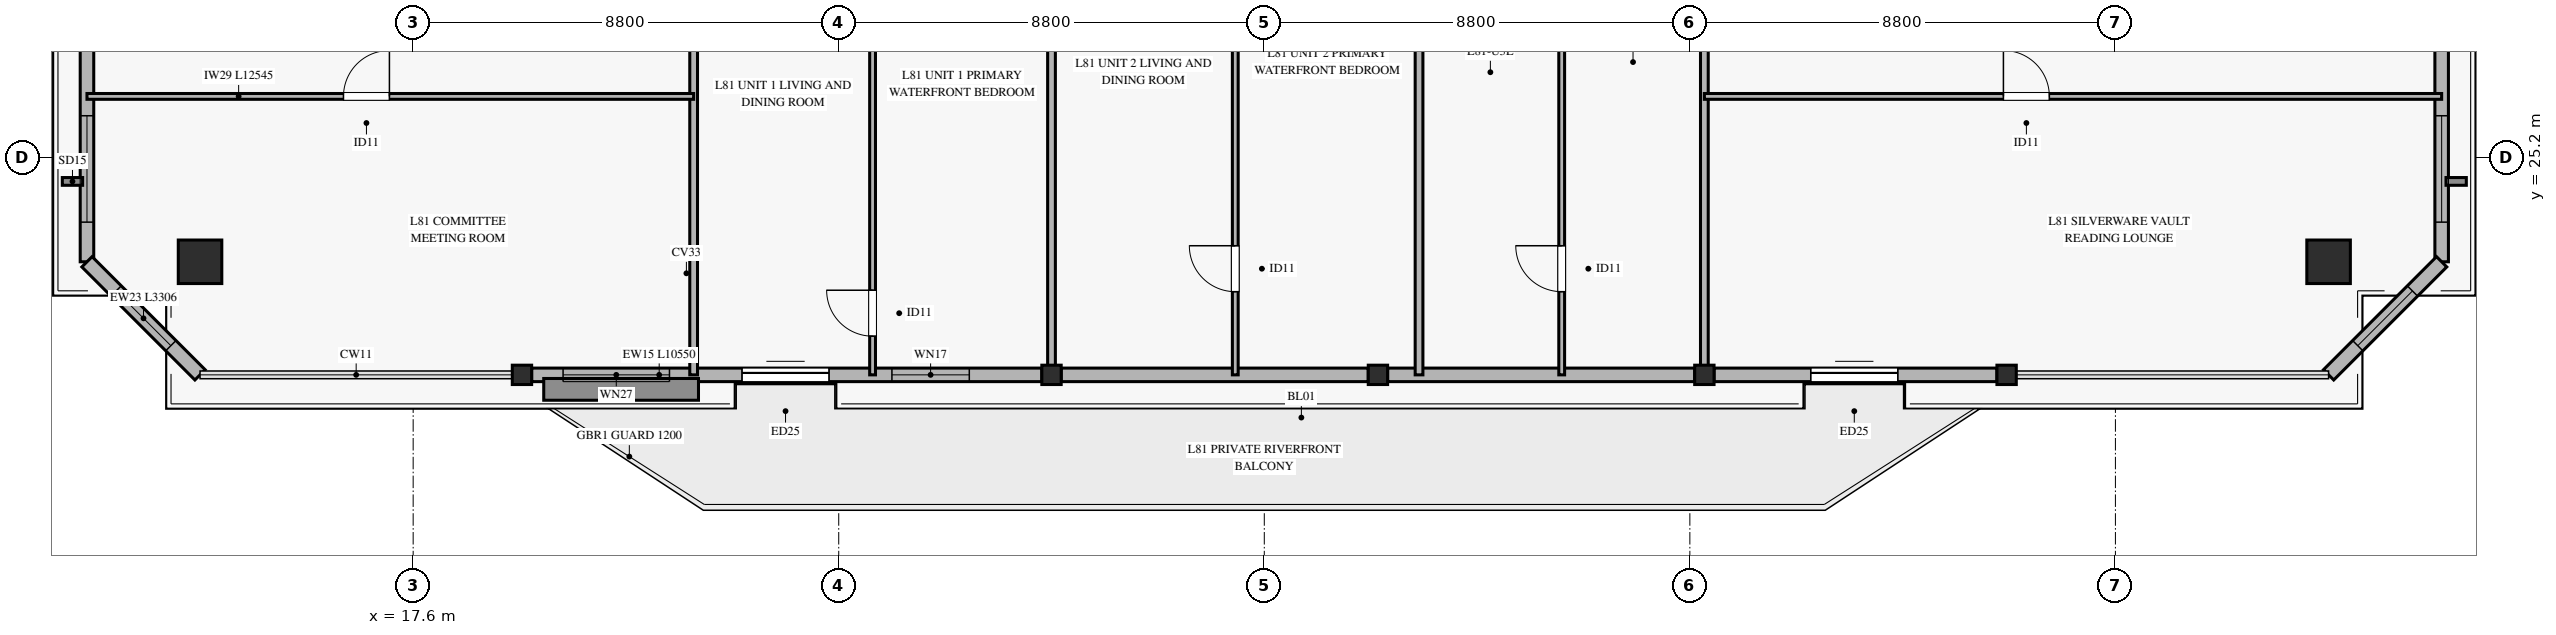
"""IFC4 building model, lengths in metres.
Left out: names, types, materials, properties, quantities, classifications, styles, units other than length and angle.
Written with IfcOpenShell. Run it as: python <this file> out.ifc"""

import sys

from ifc_helpers import new_model, si_unit, direction, frame, frame_2d, origin, origin_2d, place, context, subcontext, project, spatial, rectangle, hollow_rectangle, extrude, source, transform, mapped, element, fill, save


model = new_model("IFC4")
c1 = context("Model", 3, precision=1e-05, world=origin(), true_north=direction((0.0, 1.0)))
c2 = subcontext(c1, "Body", "Model", "MODEL_VIEW")
j1 = project(units=[si_unit("LENGTHUNIT", "METRE"), si_unit("PLANEANGLEUNIT", "RADIAN")], contexts=[c1])
p1 = place(None, origin())
s1 = spatial("IfcSite", under=j1, at=p1, CompositionType="ELEMENT")
p2 = place(p1, origin())
s2 = spatial("IfcBuilding", under=s1, at=p2, CompositionType="ELEMENT")
p3 = place(p2, frame((0.0, 0.0, 314.2)))
s3 = spatial("IfcBuildingStorey", under=s2, at=p3, CompositionType="ELEMENT", Elevation=314.2)
m1 = source(origin(), c2, "Body", "SweptSolid", [
    extrude(hollow_rectangle(XDim=0.9, YDim=0.9, WallThickness=0.04, at=origin_2d()), origin(), (0.0, 0.0, 1.0), 3.185),
])
for number, where, z_axis, x_axis in (
    (1, (13.193, 23.042, 0.0), (0.0, 0.0, 1.0), (1.0, 0.0, 0.0)),
    (2, (57.208, 23.042, 0.0), (0.0, 0.0, 1.0), (1.0, 0.0, 0.0)),
):
    element("IfcColumn", number, at=place(p3, frame(where, z_axis=z_axis, x_axis=x_axis)), inside=s3, PredefinedType="COLUMN", context=c2, shape_type="MappedRepresentation", body=[
        mapped(m1, transform((0.0, 0.0, 0.0), x_axis=(1.0, 0.0, 0.0), y_axis=(0.0, 1.0, 0.0), z_axis=(0.0, 0.0, 1.0), scale=1.0)),
    ])
m2 = source(origin(), c2, "Body", "SweptSolid", [
    extrude(hollow_rectangle(XDim=0.4, YDim=0.4, WallThickness=0.02, at=origin_2d()), origin(), (0.0, 0.0, 1.0), 3.185),
])
for number, where, z_axis, x_axis in (
    (3, (19.85, 20.704, 0.0), (0.0, 0.0, 1.0), (1.0, 0.0, 0.0)),
    (4, (30.8, 20.704, 0.0), (0.0, 0.0, 1.0), (1.0, 0.0, 0.0)),
    (5, (37.55, 20.704, 0.0), (0.0, 0.0, 1.0), (1.0, 0.0, 0.0)),
    (6, (44.3, 20.704, 0.0), (0.0, 0.0, 1.0), (1.0, 0.0, 0.0)),
    (7, (50.55, 20.704, 0.0), (0.0, 0.0, 1.0), (1.0, 0.0, 0.0)),
):
    element("IfcColumn", number, at=place(p3, frame(where, z_axis=z_axis, x_axis=x_axis)), inside=s3, PredefinedType="COLUMN", context=c2, shape_type="MappedRepresentation", body=[
        mapped(m2, transform((0.0, 0.0, 0.0), x_axis=(1.0, 0.0, 0.0), y_axis=(0.0, 1.0, 0.0), z_axis=(0.0, 0.0, 1.0), scale=1.0)),
    ])
p4 = place(p3, frame((20.05, 20.704, 0.0), z_axis=(0.0, 0.0, 1.0), x_axis=(1.0, 0.0, 0.0)))
e8 = element("IfcWall", 8, at=p4, inside=s3, PredefinedType="SOLIDWALL", context=c2, shape_type="SweptSolid", body=[
    extrude(rectangle(XDim=10.55, YDim=0.28, at=frame_2d((5.275, 0.0))), origin(), (0.0, 0.0, 1.0), 2.815),
])
p5 = place(p4, frame((4.35, 0.0, 0.0)))
e9 = element("IfcOpeningElement", 9, at=p5, cuts=e8, PredefinedType="OPENING", context=c2, shape_type="SweptSolid", body=[
    extrude(rectangle(XDim=1.8, YDim=2.25, at=frame_2d((0.9, 1.125))), frame((0.0, 0.15, 0.0), z_axis=(0.0, -1.0, 0.0), x_axis=(1.0, 0.0, 0.0)), (0.0, 0.0, 1.0), 0.3),
])
p6 = place(p4, frame((0.65, 0.0, 0.45)))
e10 = element("IfcOpeningElement", 10, at=p6, cuts=e8, PredefinedType="OPENING", context=c2, shape_type="SweptSolid", body=[
    extrude(rectangle(XDim=2.2, YDim=2.1, at=frame_2d((1.1, 1.05))), frame((0.0, 0.15, 0.0), z_axis=(0.0, -1.0, 0.0), x_axis=(1.0, 0.0, 0.0)), (0.0, 0.0, 1.0), 0.3),
])
p7 = place(p4, frame((7.45, 0.0, 0.45)))
e11 = element("IfcOpeningElement", 11, at=p7, cuts=e8, PredefinedType="OPENING", context=c2, shape_type="SweptSolid", body=[
    extrude(rectangle(XDim=1.6, YDim=2.0, at=frame_2d((0.8, 1.0))), frame((0.0, 0.15, 0.0), z_axis=(0.0, -1.0, 0.0), x_axis=(1.0, 0.0, 0.0)), (0.0, 0.0, 1.0), 0.3),
])
for number, where, z_axis, x_axis in (
    (12, (31.0, 20.704, 0.0), (0.0, 0.0, 1.0), (1.0, 0.0, 0.0)),
    (13, (37.75, 20.704, 0.0), (0.0, 0.0, 1.0), (1.0, 0.0, 0.0)),
):
    element("IfcWall", number, at=place(p3, frame(where, z_axis=z_axis, x_axis=x_axis)), inside=s3, PredefinedType="SOLIDWALL", context=c2, shape_type="SweptSolid", body=[
        extrude(rectangle(XDim=6.35, YDim=0.28, at=frame_2d((3.175, 0.0))), origin(), (0.0, 0.0, 1.0), 2.815),
    ])
p8 = place(p3, frame((44.5, 20.704, 0.0), z_axis=(0.0, 0.0, 1.0), x_axis=(1.0, 0.0, 0.0)))
e14 = element("IfcWall", 14, at=p8, inside=s3, PredefinedType="SOLIDWALL", context=c2, shape_type="SweptSolid", body=[
    extrude(rectangle(XDim=5.85, YDim=0.28, at=frame_2d((2.925, 0.0))), origin(), (0.0, 0.0, 1.0), 2.815),
])
p9 = place(p8, frame((2.0, 0.0, 0.0)))
e15 = element("IfcOpeningElement", 15, at=p9, cuts=e14, PredefinedType="OPENING", context=c2, shape_type="SweptSolid", body=[
    extrude(rectangle(XDim=1.8, YDim=2.25, at=frame_2d((0.9, 1.125))), frame((0.0, 0.15, 0.0), z_axis=(0.0, -1.0, 0.0), x_axis=(1.0, 0.0, 0.0)), (0.0, 0.0, 1.0), 0.3),
])
p10 = place(p3, frame((10.855, 23.042, 0.0), z_axis=(0.0, 0.0, 1.0), x_axis=(0.0, 1.0, 0.0)))
e16 = element("IfcWall", 16, at=p10, inside=s3, PredefinedType="SOLIDWALL", context=c2, shape_type="SweptSolid", body=[
    extrude(rectangle(XDim=10.16, YDim=0.28, at=frame_2d((5.08, 0.0))), origin(), (0.0, 0.0, 1.0), 2.815),
])
p11 = place(p10, frame((0.82, 0.0, 0.45)))
e17 = element("IfcOpeningElement", 17, at=p11, cuts=e16, PredefinedType="OPENING", context=c2, shape_type="SweptSolid", body=[
    extrude(rectangle(XDim=2.2, YDim=2.1, at=frame_2d((1.1, 1.05))), frame((0.0, 0.15, 0.0), z_axis=(0.0, -1.0, 0.0), x_axis=(1.0, 0.0, 0.0)), (0.0, 0.0, 1.0), 0.3),
])
p12 = place(p10, frame((6.362, 0.0, 0.45)))
e18 = element("IfcOpeningElement", 18, at=p12, cuts=e16, PredefinedType="OPENING", context=c2, shape_type="SweptSolid", body=[
    extrude(rectangle(XDim=2.2, YDim=2.1, at=frame_2d((1.1, 1.05))), frame((0.0, 0.15, 0.0), z_axis=(0.0, -1.0, 0.0), x_axis=(1.0, 0.0, 0.0)), (0.0, 0.0, 1.0), 0.3),
])
p13 = place(p3, frame((59.546, 23.042, 0.0), z_axis=(0.0, 0.0, 1.0), x_axis=(0.0, 1.0, 0.0)))
e19 = element("IfcWall", 19, at=p13, inside=s3, PredefinedType="SOLIDWALL", context=c2, shape_type="SweptSolid", body=[
    extrude(rectangle(XDim=10.16, YDim=0.28, at=frame_2d((5.08, 0.0))), origin(), (0.0, 0.0, 1.0), 2.815),
])
p14 = place(p13, frame((0.82, 0.0, 0.45)))
e20 = element("IfcOpeningElement", 20, at=p14, cuts=e19, PredefinedType="OPENING", context=c2, shape_type="SweptSolid", body=[
    extrude(rectangle(XDim=2.2, YDim=2.1, at=frame_2d((1.1, 1.05))), frame((0.0, 0.15, 0.0), z_axis=(0.0, -1.0, 0.0), x_axis=(1.0, 0.0, 0.0)), (0.0, 0.0, 1.0), 0.3),
])
p15 = place(p13, frame((6.362, 0.0, 0.45)))
e21 = element("IfcOpeningElement", 21, at=p15, cuts=e19, PredefinedType="OPENING", context=c2, shape_type="SweptSolid", body=[
    extrude(rectangle(XDim=2.2, YDim=2.1, at=frame_2d((1.1, 1.05))), frame((0.0, 0.15, 0.0), z_axis=(0.0, -1.0, 0.0), x_axis=(1.0, 0.0, 0.0)), (0.0, 0.0, 1.0), 0.3),
])
p16 = place(p3, frame((10.855, 23.042, 0.0), z_axis=(0.0, 0.0, 1.0), x_axis=(0.707143699075, -0.70706986137, 0.0)))
e22 = element("IfcWall", 22, at=p16, inside=s3, PredefinedType="SOLIDWALL", context=c2, shape_type="SweptSolid", body=[
    extrude(rectangle(XDim=3.306, YDim=0.3, at=frame_2d((1.653, 0.0))), origin(), (0.0, 0.0, 1.0), 2.815),
])
p17 = place(p16, frame((0.853, 0.0, 0.45)))
e23 = element("IfcOpeningElement", 23, at=p17, cuts=e22, PredefinedType="OPENING", context=c2, shape_type="SweptSolid", body=[
    extrude(rectangle(XDim=1.6, YDim=2.0, at=frame_2d((0.8, 1.0))), frame((0.0, 0.16, 0.0), z_axis=(0.0, -1.0, 0.0), x_axis=(1.0, 0.0, 0.0)), (0.0, 0.0, 1.0), 0.32),
])
p18 = place(p3, frame((57.208, 20.704, 0.0), z_axis=(0.0, 0.0, 1.0), x_axis=(0.707106781187, 0.707106781187, 0.0)))
e24 = element("IfcWall", 24, at=p18, inside=s3, PredefinedType="SOLIDWALL", context=c2, shape_type="SweptSolid", body=[
    extrude(rectangle(XDim=3.306, YDim=0.3, at=frame_2d((1.653, 0.0))), origin(), (0.0, 0.0, 1.0), 2.815),
])
p19 = place(p18, frame((0.853, 0.0, 0.45)))
e25 = element("IfcOpeningElement", 25, at=p19, cuts=e24, PredefinedType="OPENING", context=c2, shape_type="SweptSolid", body=[
    extrude(rectangle(XDim=1.6, YDim=2.0, at=frame_2d((0.8, 1.0))), frame((0.0, 0.16, 0.0), z_axis=(0.0, -1.0, 0.0), x_axis=(1.0, 0.0, 0.0)), (0.0, 0.0, 1.0), 0.32),
])
p20 = place(p3, frame((23.4, 20.704, 0.0), z_axis=(0.0, 0.0, 1.0), x_axis=(0.0, 1.0, 0.0)))
e26 = element("IfcWall", 26, at=p20, inside=s3, PredefinedType="PARTITIONING", context=c2, shape_type="SweptSolid", body=[
    extrude(rectangle(XDim=16.746, YDim=0.16, at=frame_2d((8.373, 0.0))), origin(), (0.0, 0.0, 1.0), 2.77),
])
p21 = place(p20, frame((13.766, 0.0, 0.0)))
e27 = element("IfcOpeningElement", 27, at=p21, cuts=e26, PredefinedType="OPENING", context=c2, shape_type="SweptSolid", body=[
    extrude(rectangle(XDim=1.05, YDim=2.15, at=frame_2d((0.525, 1.075))), frame((0.0, 0.09, 0.0), z_axis=(0.0, -1.0, 0.0), x_axis=(1.0, 0.0, 0.0)), (0.0, 0.0, 1.0), 0.18),
])
p22 = place(p3, frame((30.8, 20.704, 0.0), z_axis=(0.0, 0.0, 1.0), x_axis=(0.0, 1.0, 0.0)))
e28 = element("IfcWall", 28, at=p22, inside=s3, PredefinedType="PARTITIONING", context=c2, shape_type="SweptSolid", body=[
    extrude(rectangle(XDim=13.346, YDim=0.16, at=frame_2d((6.673, 0.0))), origin(), (0.0, 0.0, 1.0), 2.47),
])
p23 = place(p3, frame((38.4, 20.704, 0.0), z_axis=(0.0, 0.0, 1.0), x_axis=(0.0, 1.0, 0.0)))
e29 = element("IfcWall", 29, at=p23, inside=s3, PredefinedType="PARTITIONING", context=c2, shape_type="SweptSolid", body=[
    extrude(rectangle(XDim=13.346, YDim=0.16, at=frame_2d((6.673, 0.0))), origin(), (0.0, 0.0, 1.0), 2.77),
])
p24 = place(p3, frame((44.3, 20.704, 0.0), z_axis=(0.0, 0.0, 1.0), x_axis=(0.0, 1.0, 0.0)))
e30 = element("IfcWall", 30, at=p24, inside=s3, PredefinedType="PARTITIONING", context=c2, shape_type="SweptSolid", body=[
    extrude(rectangle(XDim=16.746, YDim=0.16, at=frame_2d((8.373, 0.0))), origin(), (0.0, 0.0, 1.0), 2.47),
])
p25 = place(p24, frame((13.766, 0.0, 0.0)))
e31 = element("IfcOpeningElement", 31, at=p25, cuts=e30, PredefinedType="OPENING", context=c2, shape_type="SweptSolid", body=[
    extrude(rectangle(XDim=1.05, YDim=2.15, at=frame_2d((0.525, 1.075))), frame((0.0, 0.09, 0.0), z_axis=(0.0, -1.0, 0.0), x_axis=(1.0, 0.0, 0.0)), (0.0, 0.0, 1.0), 0.18),
])
p26 = place(p3, frame((10.855, 26.462, 0.0), z_axis=(0.0, 0.0, 1.0), x_axis=(1.0, 0.0, 0.0)))
e32 = element("IfcWall", 32, at=p26, inside=s3, PredefinedType="PARTITIONING", context=c2, shape_type="SweptSolid", body=[
    extrude(rectangle(XDim=12.545, YDim=0.12, at=frame_2d((6.272, 0.0))), origin(), (0.0, 0.0, 1.0), 2.47),
])
p27 = place(p26, frame((5.304, 0.0, 0.0)))
e33 = element("IfcOpeningElement", 33, at=p27, cuts=e32, PredefinedType="OPENING", context=c2, shape_type="SweptSolid", body=[
    extrude(rectangle(XDim=0.95, YDim=2.1, at=frame_2d((0.475, 1.05))), frame((0.0, 0.07, 0.0), z_axis=(0.0, -1.0, 0.0), x_axis=(1.0, 0.0, 0.0)), (0.0, 0.0, 1.0), 0.14),
])
p28 = place(p3, frame((27.1, 20.704, 0.0), z_axis=(0.0, 0.0, 1.0), x_axis=(0.0, 1.0, 0.0)))
e34 = element("IfcWall", 34, at=p28, inside=s3, PredefinedType="PARTITIONING", context=c2, shape_type="SweptSolid", body=[
    extrude(rectangle(XDim=10.696, YDim=0.12, at=frame_2d((5.348, 0.0))), origin(), (0.0, 0.0, 1.0), 2.77),
])
p29 = place(p28, frame((0.8, 0.0, 0.0)))
e35 = element("IfcOpeningElement", 35, at=p29, cuts=e34, PredefinedType="OPENING", context=c2, shape_type="SweptSolid", body=[
    extrude(rectangle(XDim=0.95, YDim=2.1, at=frame_2d((0.475, 1.05))), frame((0.0, 0.07, 0.0), z_axis=(0.0, -1.0, 0.0), x_axis=(1.0, 0.0, 0.0)), (0.0, 0.0, 1.0), 0.14),
])
p30 = place(p3, frame((34.6, 20.704, 0.0), z_axis=(0.0, 0.0, 1.0), x_axis=(0.0, 1.0, 0.0)))
e36 = element("IfcWall", 36, at=p30, inside=s3, PredefinedType="PARTITIONING", context=c2, shape_type="SweptSolid", body=[
    extrude(rectangle(XDim=10.696, YDim=0.12, at=frame_2d((5.348, 0.0))), origin(), (0.0, 0.0, 1.0), 2.77),
])
p31 = place(p30, frame((1.72, 0.0, 0.0)))
e37 = element("IfcOpeningElement", 37, at=p31, cuts=e36, PredefinedType="OPENING", context=c2, shape_type="SweptSolid", body=[
    extrude(rectangle(XDim=0.95, YDim=2.1, at=frame_2d((0.475, 1.05))), frame((0.0, 0.07, 0.0), z_axis=(0.0, -1.0, 0.0), x_axis=(1.0, 0.0, 0.0)), (0.0, 0.0, 1.0), 0.14),
])
p32 = place(p3, frame((41.35, 20.704, 0.0), z_axis=(0.0, 0.0, 1.0), x_axis=(0.0, 1.0, 0.0)))
e38 = element("IfcWall", 38, at=p32, inside=s3, PredefinedType="PARTITIONING", context=c2, shape_type="SweptSolid", body=[
    extrude(rectangle(XDim=10.696, YDim=0.12, at=frame_2d((5.348, 0.0))), origin(), (0.0, 0.0, 1.0), 2.77),
])
p33 = place(p32, frame((1.72, 0.0, 0.0)))
e39 = element("IfcOpeningElement", 39, at=p33, cuts=e38, PredefinedType="OPENING", context=c2, shape_type="SweptSolid", body=[
    extrude(rectangle(XDim=0.95, YDim=2.1, at=frame_2d((0.475, 1.05))), frame((0.0, 0.07, 0.0), z_axis=(0.0, -1.0, 0.0), x_axis=(1.0, 0.0, 0.0)), (0.0, 0.0, 1.0), 0.14),
])
p34 = place(p3, frame((44.3, 26.462, 0.0), z_axis=(0.0, 0.0, 1.0), x_axis=(1.0, 0.0, 0.0)))
e40 = element("IfcWall", 40, at=p34, inside=s3, PredefinedType="PARTITIONING", context=c2, shape_type="SweptSolid", body=[
    extrude(rectangle(XDim=15.246, YDim=0.12, at=frame_2d((7.623, 0.0))), origin(), (0.0, 0.0, 1.0), 2.47),
])
p35 = place(p34, frame((6.184, 0.0, 0.0)))
e41 = element("IfcOpeningElement", 41, at=p35, cuts=e40, PredefinedType="OPENING", context=c2, shape_type="SweptSolid", body=[
    extrude(rectangle(XDim=0.95, YDim=2.1, at=frame_2d((0.475, 1.05))), frame((0.0, 0.07, 0.0), z_axis=(0.0, -1.0, 0.0), x_axis=(1.0, 0.0, 0.0)), (0.0, 0.0, 1.0), 0.14),
])
m3 = source(origin(), c2, "Body", "SweptSolid", [
    extrude(rectangle(XDim=1.8, YDim=2.25, at=frame_2d((0.9, 1.125))), frame((0.0, 0.025, 0.0), z_axis=(0.0, -1.0, 0.0), x_axis=(1.0, 0.0, 0.0)), (0.0, 0.0, 1.0), 0.05),
])
p36 = place(p5, origin())
e42 = element("IfcDoor", 42, at=p36, inside=s3, OperationType="SLIDING_TO_LEFT", PredefinedType="DOOR", context=c2, shape_type="MappedRepresentation", body=[
    mapped(m3, transform((0.0, 0.0, 0.0), x_axis=(1.0, 0.0, 0.0), y_axis=(0.0, 1.0, 0.0), z_axis=(0.0, 0.0, 1.0), scale=1.0)),
])
fill(e9, e42)
m4 = source(origin(), c2, "Body", "SweptSolid", [
    extrude(rectangle(XDim=2.2, YDim=2.1, at=frame_2d((1.1, 1.05))), frame((0.0, 0.03, 0.0), z_axis=(0.0, -1.0, 0.0), x_axis=(1.0, 0.0, 0.0)), (0.0, 0.0, 1.0), 0.06),
])
p37 = place(p6, origin())
e43 = element("IfcWindow", 43, at=p37, inside=s3, PartitioningType="SINGLE_PANEL", PredefinedType="WINDOW", context=c2, shape_type="MappedRepresentation", body=[
    mapped(m4, transform((0.0, 0.0, 0.0), x_axis=(1.0, 0.0, 0.0), y_axis=(0.0, 1.0, 0.0), z_axis=(0.0, 0.0, 1.0), scale=1.0)),
])
fill(e10, e43)
m5 = source(origin(), c2, "Body", "SweptSolid", [
    extrude(rectangle(XDim=1.6, YDim=2.0, at=frame_2d((0.8, 1.0))), frame((0.0, 0.03, 0.0), z_axis=(0.0, -1.0, 0.0), x_axis=(1.0, 0.0, 0.0)), (0.0, 0.0, 1.0), 0.06),
])
p38 = place(p7, origin())
e44 = element("IfcWindow", 44, at=p38, inside=s3, PartitioningType="SINGLE_PANEL", PredefinedType="WINDOW", context=c2, shape_type="MappedRepresentation", body=[
    mapped(m5, transform((0.0, 0.0, 0.0), x_axis=(1.0, 0.0, 0.0), y_axis=(0.0, 1.0, 0.0), z_axis=(0.0, 0.0, 1.0), scale=1.0)),
])
fill(e11, e44)
p39 = place(p9, origin())
e45 = element("IfcDoor", 45, at=p39, inside=s3, OperationType="SLIDING_TO_LEFT", PredefinedType="DOOR", context=c2, shape_type="MappedRepresentation", body=[
    mapped(m3, transform((0.0, 0.0, 0.0), x_axis=(1.0, 0.0, 0.0), y_axis=(0.0, 1.0, 0.0), z_axis=(0.0, 0.0, 1.0), scale=1.0)),
])
fill(e15, e45)
p40 = place(p11, origin())
e46 = element("IfcWindow", 46, at=p40, inside=s3, PartitioningType="SINGLE_PANEL", PredefinedType="WINDOW", context=c2, shape_type="MappedRepresentation", body=[
    mapped(m4, transform((0.0, 0.0, 0.0), x_axis=(1.0, 0.0, 0.0), y_axis=(0.0, 1.0, 0.0), z_axis=(0.0, 0.0, 1.0), scale=1.0)),
])
fill(e17, e46)
p41 = place(p14, origin())
e47 = element("IfcWindow", 47, at=p41, inside=s3, PartitioningType="SINGLE_PANEL", PredefinedType="WINDOW", context=c2, shape_type="MappedRepresentation", body=[
    mapped(m4, transform((0.0, 0.0, 0.0), x_axis=(1.0, 0.0, 0.0), y_axis=(0.0, 1.0, 0.0), z_axis=(0.0, 0.0, 1.0), scale=1.0)),
])
fill(e20, e47)
p42 = place(p17, origin())
e48 = element("IfcWindow", 48, at=p42, inside=s3, PartitioningType="SINGLE_PANEL", PredefinedType="WINDOW", context=c2, shape_type="MappedRepresentation", body=[
    mapped(m5, transform((0.0, 0.0, 0.0), x_axis=(1.0, 0.0, 0.0), y_axis=(0.0, 1.0, 0.0), z_axis=(0.0, 0.0, 1.0), scale=1.0)),
])
fill(e23, e48)
p43 = place(p19, origin())
e49 = element("IfcWindow", 49, at=p43, inside=s3, PartitioningType="SINGLE_PANEL", PredefinedType="WINDOW", context=c2, shape_type="MappedRepresentation", body=[
    mapped(m5, transform((0.0, 0.0, 0.0), x_axis=(1.0, 0.0, 0.0), y_axis=(0.0, 1.0, 0.0), z_axis=(0.0, 0.0, 1.0), scale=1.0)),
])
fill(e25, e49)
m6 = source(origin(), c2, "Body", "SweptSolid", [
    extrude(rectangle(XDim=0.95, YDim=2.1, at=frame_2d((0.475, 1.05))), frame((0.0, 0.025, 0.0), z_axis=(0.0, -1.0, 0.0), x_axis=(1.0, 0.0, 0.0)), (0.0, 0.0, 1.0), 0.05),
])
p44 = place(p27, origin())
e50 = element("IfcDoor", 50, at=p44, inside=s3, OperationType="SINGLE_SWING_RIGHT", PredefinedType="DOOR", context=c2, shape_type="MappedRepresentation", body=[
    mapped(m6, transform((0.0, 0.0, 0.0), x_axis=(1.0, 0.0, 0.0), y_axis=(0.0, 1.0, 0.0), z_axis=(0.0, 0.0, 1.0), scale=1.0)),
])
fill(e33, e50)
p45 = place(p29, origin())
e51 = element("IfcDoor", 51, at=p45, inside=s3, OperationType="SINGLE_SWING_RIGHT", PredefinedType="DOOR", context=c2, shape_type="MappedRepresentation", body=[
    mapped(m6, transform((0.0, 0.0, 0.0), x_axis=(1.0, 0.0, 0.0), y_axis=(0.0, 1.0, 0.0), z_axis=(0.0, 0.0, 1.0), scale=1.0)),
])
fill(e35, e51)
p46 = place(p31, origin())
e52 = element("IfcDoor", 52, at=p46, inside=s3, OperationType="SINGLE_SWING_RIGHT", PredefinedType="DOOR", context=c2, shape_type="MappedRepresentation", body=[
    mapped(m6, transform((0.0, 0.0, 0.0), x_axis=(1.0, 0.0, 0.0), y_axis=(0.0, 1.0, 0.0), z_axis=(0.0, 0.0, 1.0), scale=1.0)),
])
fill(e37, e52)
p47 = place(p33, origin())
e53 = element("IfcDoor", 53, at=p47, inside=s3, OperationType="SINGLE_SWING_RIGHT", PredefinedType="DOOR", context=c2, shape_type="MappedRepresentation", body=[
    mapped(m6, transform((0.0, 0.0, 0.0), x_axis=(1.0, 0.0, 0.0), y_axis=(0.0, 1.0, 0.0), z_axis=(0.0, 0.0, 1.0), scale=1.0)),
])
fill(e39, e53)
p48 = place(p35, origin())
e54 = element("IfcDoor", 54, at=p48, inside=s3, OperationType="SINGLE_SWING_LEFT", PredefinedType="DOOR", context=c2, shape_type="MappedRepresentation", body=[
    mapped(m6, transform((0.0, 0.0, 0.0), x_axis=(1.0, 0.0, 0.0), y_axis=(0.0, 1.0, 0.0), z_axis=(0.0, 0.0, 1.0), scale=1.0)),
])
fill(e41, e54)
save(model, sys.argv[1])
